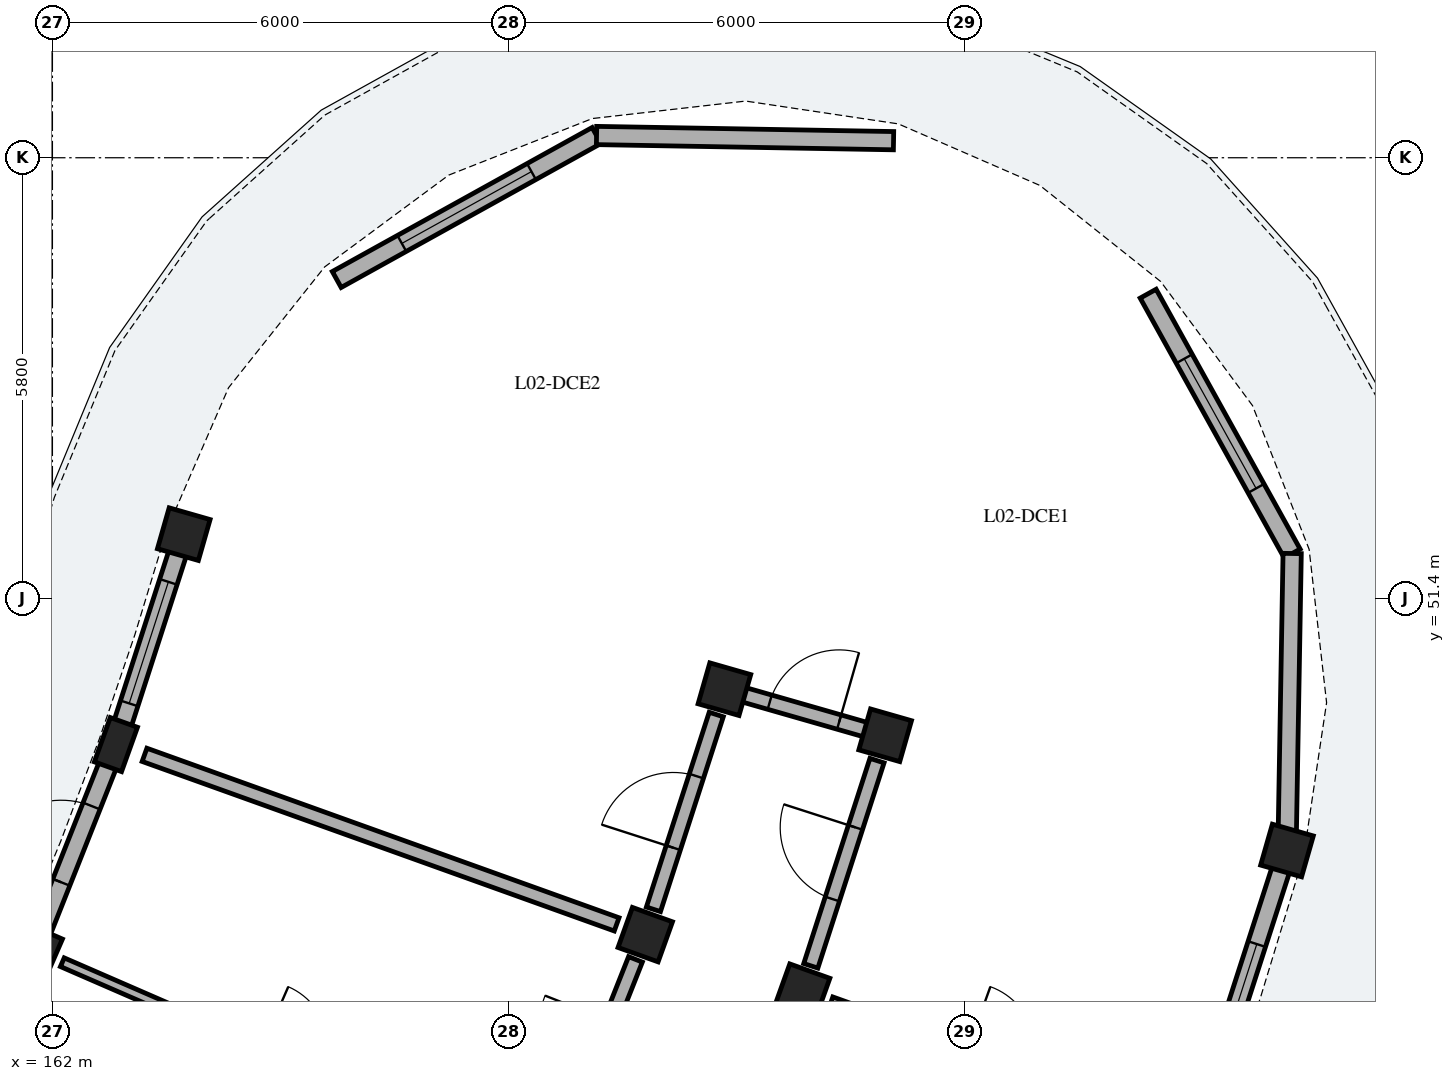
"""IFC4 building model, lengths in metres.
Left out: names, types, materials, properties, quantities, classifications, styles, units other than length and angle.
Written with IfcOpenShell. Run it as: python <this file> out.ifc"""

import sys

from ifc_helpers import new_model, si_unit, direction, frame, frame_2d, origin, origin_2d, place, context, subcontext, project, spatial, rectangle, extrude, element, fill, save


model = new_model("IFC4")
c1 = context("Model", 3, precision=1e-05, world=origin(), true_north=direction((0.0, 1.0)))
c2 = subcontext(c1, "Body", "Model", "MODEL_VIEW")
j1 = project(units=[si_unit("LENGTHUNIT", "METRE"), si_unit("PLANEANGLEUNIT", "RADIAN")], contexts=[c1])
p1 = place(None, origin())
s1 = spatial("IfcSite", under=j1, at=p1, CompositionType="ELEMENT")
p2 = place(p1, origin())
s2 = spatial("IfcBuilding", under=s1, at=p2, CompositionType="ELEMENT")
p3 = place(p2, frame((0.0, 0.0, 8.84)))
s3 = spatial("IfcBuildingStorey", under=s2, at=p3, CompositionType="ELEMENT", Elevation=8.84)
p4 = place(p3, frame((161.763, 46.776, 0.0), z_axis=(0.0, 0.0, 1.0), x_axis=(0.917060074385, -0.398749068925, 0.0)))
e1 = element("IfcColumn", 1, at=p4, inside=s3, PredefinedType="COLUMN", context=c2, shape_type="SweptSolid", body=[
    extrude(rectangle(XDim=0.56, YDim=0.56, at=origin_2d()), origin(), (0.0, 0.0, 1.0), 3.105),
])
p5 = place(p3, frame((162.835, 49.479, 0.0), z_axis=(0.0, 0.0, 1.0), x_axis=(0.941176015256, -0.337916718003, 0.0)))
e2 = element("IfcColumn", 2, at=p5, inside=s3, PredefinedType="PILASTER", context=c2, shape_type="SweptSolid", body=[
    extrude(rectangle(XDim=0.38, YDim=0.62, at=origin_2d()), origin(), (0.0, 0.0, 1.0), 3.105),
])
for number, where, z_axis, x_axis in (
    (3, (169.8, 46.979, 0.0), (0.0, 0.0, 1.0), (0.941, -0.338, 0.0)),
    (4, (171.871, 46.236, 0.0), (0.0, 0.0, 1.0), (0.941, -0.338, 0.0)),
    (5, (163.728, 52.248, 0.0), (0.0, 0.0, 1.0), (0.961, -0.276, 0.0)),
    (6, (170.841, 50.208, 0.0), (0.0, 0.0, 1.0), (0.961, -0.276, 0.0)),
    (7, (172.956, 49.602, 0.0), (0.0, 0.0, 1.0), (0.961, -0.276, 0.0)),
    (8, (178.243, 48.086, 0.0), (0.0, 0.0, 1.0), (0.961, -0.276, 0.0)),
):
    element("IfcColumn", number, at=place(p3, frame(where, z_axis=z_axis, x_axis=x_axis)), inside=s3, PredefinedType="COLUMN", context=c2, shape_type="SweptSolid", body=[
        extrude(rectangle(XDim=0.56, YDim=0.56, at=origin_2d()), origin(), (0.0, 0.0, 1.0), 3.105),
    ])
p6 = place(p3, frame((161.855, 47.008, 0.0), z_axis=(0.0, 0.0, 1.0), x_axis=(0.368558756085, 0.9296044553, 0.0)))
e9 = element("IfcWall", 9, at=p6, inside=s3, PredefinedType="SOLIDWALL", context=c2, shape_type="SweptSolid", body=[
    extrude(rectangle(XDim=2.499, YDim=0.24, at=frame_2d((1.249, 0.0))), origin(), (0.0, 0.0, 1.0), 2.355),
])
p7 = place(p6, frame((0.709, 0.0, 0.0)))
e10 = element("IfcOpeningElement", 10, at=p7, cuts=e9, PredefinedType="OPENING", context=c2, shape_type="SweptSolid", body=[
    extrude(rectangle(XDim=1.08, YDim=2.15, at=frame_2d((0.54, 1.075))), frame((0.0, 0.13, 0.0), z_axis=(0.0, -1.0, 0.0), x_axis=(1.0, 0.0, 0.0)), (0.0, 0.0, 1.0), 0.26),
])
p8 = place(p3, frame((177.096, 44.529, 0.0), z_axis=(0.0, 0.0, 1.0), x_axis=(0.306949591136, 0.951725773793, 0.0)))
e11 = element("IfcWall", 11, at=p8, inside=s3, PredefinedType="SOLIDWALL", context=c2, shape_type="SweptSolid", body=[
    extrude(rectangle(XDim=3.487, YDim=0.24, at=frame_2d((1.743, 0.0))), origin(), (0.0, 0.0, 1.0), 2.355),
])
p9 = place(p8, frame((1.043, 0.0, 0.55)))
e12 = element("IfcOpeningElement", 12, at=p9, cuts=e11, PredefinedType="OPENING", context=c2, shape_type="SweptSolid", body=[
    extrude(rectangle(XDim=1.4, YDim=1.635, at=frame_2d((0.7, 0.817))), frame((0.0, 0.13, 0.0), z_axis=(0.0, -1.0, 0.0), x_axis=(1.0, 0.0, 0.0)), (0.0, 0.0, 1.0), 0.26),
])
p10 = place(p3, frame((162.884, 49.632, 0.0), z_axis=(0.0, 0.0, 1.0), x_axis=(0.306979942778, 0.951715984279, 0.0)))
e13 = element("IfcWall", 13, at=p10, inside=s3, PredefinedType="SOLIDWALL", context=c2, shape_type="SweptSolid", body=[
    extrude(rectangle(XDim=2.499, YDim=0.24, at=frame_2d((1.25, 0.0))), origin(), (0.0, 0.0, 1.0), 2.355),
])
p11 = place(p10, frame((0.409, 0.0, 0.55)))
e14 = element("IfcOpeningElement", 14, at=p11, cuts=e13, PredefinedType="OPENING", context=c2, shape_type="SweptSolid", body=[
    extrude(rectangle(XDim=1.68, YDim=1.585, at=frame_2d((0.84, 0.792))), frame((0.0, 0.13, 0.0), z_axis=(0.0, -1.0, 0.0), x_axis=(1.0, 0.0, 0.0)), (0.0, 0.0, 1.0), 0.26),
])
p12 = place(p3, frame((165.741, 55.598, 0.0), z_axis=(0.0, 0.0, 1.0), x_axis=(0.874616555828, 0.48481530532, 0.0)))
e15 = element("IfcWall", 15, at=p12, inside=s3, PredefinedType="SOLIDWALL", context=c2, shape_type="SweptSolid", body=[
    extrude(rectangle(XDim=3.908, YDim=0.24, at=frame_2d((1.954, 0.0))), origin(), (0.0, 0.0, 1.0), 2.355),
])
p13 = place(p12, frame((0.979, 0.0, 0.4)))
e16 = element("IfcOpeningElement", 16, at=p13, cuts=e15, PredefinedType="OPENING", context=c2, shape_type="SweptSolid", body=[
    extrude(rectangle(XDim=1.95, YDim=1.78, at=frame_2d((0.975, 0.89))), frame((0.0, 0.13, 0.0), z_axis=(0.0, -1.0, 0.0), x_axis=(1.0, 0.0, 0.0)), (0.0, 0.0, 1.0), 0.26),
])
p14 = place(p3, frame((169.159, 57.493, 0.0), z_axis=(0.0, 0.0, 1.0), x_axis=(0.999847005776, -0.017491856396, 0.0)))
e17 = element("IfcWall", 17, at=p14, inside=s3, PredefinedType="SOLIDWALL", context=c2, shape_type="SweptSolid", body=[
    extrude(rectangle(XDim=3.908, YDim=0.24, at=frame_2d((1.954, 0.0))), origin(), (0.0, 0.0, 1.0), 2.355),
])
p15 = place(p3, frame((176.417, 55.412, 0.0), z_axis=(0.0, 0.0, 1.0), x_axis=(0.48481530532, -0.874616555828, 0.0)))
e18 = element("IfcWall", 18, at=p15, inside=s3, PredefinedType="SOLIDWALL", context=c2, shape_type="SweptSolid", body=[
    extrude(rectangle(XDim=3.908, YDim=0.24, at=frame_2d((1.954, 0.0))), origin(), (0.0, 0.0, 1.0), 2.355),
])
p16 = place(p15, frame((0.979, 0.0, 0.4)))
e19 = element("IfcOpeningElement", 19, at=p16, cuts=e18, PredefinedType="OPENING", context=c2, shape_type="SweptSolid", body=[
    extrude(rectangle(XDim=1.95, YDim=1.78, at=frame_2d((0.975, 0.89))), frame((0.0, 0.13, 0.0), z_axis=(0.0, -1.0, 0.0), x_axis=(1.0, 0.0, 0.0)), (0.0, 0.0, 1.0), 0.26),
])
p17 = place(p3, frame((178.311, 51.993, 0.0), z_axis=(0.0, 0.0, 1.0), x_axis=(-0.017428315893, -0.999848115368, 0.0)))
e20 = element("IfcWall", 20, at=p17, inside=s3, PredefinedType="SOLIDWALL", context=c2, shape_type="SweptSolid", body=[
    extrude(rectangle(XDim=3.908, YDim=0.24, at=frame_2d((1.954, 0.0))), origin(), (0.0, 0.0, 1.0), 2.355),
])
p18 = place(p3, frame((162.13, 46.616, 0.0), z_axis=(0.0, 0.0, 1.0), x_axis=(0.9170582943, -0.398753162817, 0.0)))
e21 = element("IfcWall", 21, at=p18, inside=s3, PredefinedType="PARTITIONING", context=c2, shape_type="SweptSolid", body=[
    extrude(rectangle(XDim=6.6, YDim=0.125, at=frame_2d((3.3, 0.0))), origin(), (0.0, 0.0, 1.0), 2.37),
])
p19 = place(p18, frame((2.855, 0.0, 0.0)))
e22 = element("IfcOpeningElement", 22, at=p19, cuts=e21, PredefinedType="OPENING", context=c2, shape_type="SweptSolid", body=[
    extrude(rectangle(XDim=0.89, YDim=2.1, at=frame_2d((0.445, 1.05))), frame((0.0, 0.073, 0.0), z_axis=(0.0, -1.0, 0.0), x_axis=(1.0, 0.0, 0.0)), (0.0, 0.0, 1.0), 0.145),
])
p20 = place(p3, frame((168.678, 44.15, 0.0), z_axis=(0.0, 0.0, 1.0), x_axis=(0.368528468945, 0.929616462622, 0.0)))
e23 = element("IfcWall", 23, at=p20, inside=s3, PredefinedType="PARTITIONING", context=c2, shape_type="SweptSolid", body=[
    extrude(rectangle(XDim=2.693, YDim=0.195, at=frame_2d((1.346, 0.0))), origin(), (0.0, 0.0, 1.0), 2.37),
])
p21 = place(p20, frame((0.882, 0.0, 0.0)))
e24 = element("IfcOpeningElement", 24, at=p21, cuts=e23, PredefinedType="OPENING", context=c2, shape_type="SweptSolid", body=[
    extrude(rectangle(XDim=0.93, YDim=2.12, at=frame_2d((0.465, 1.06))), frame((0.0, 0.107, 0.0), z_axis=(0.0, -1.0, 0.0), x_axis=(1.0, 0.0, 0.0)), (0.0, 0.0, 1.0), 0.215),
])
p22 = place(p3, frame((172.247, 46.1, 0.0), z_axis=(0.0, 0.0, 1.0), x_axis=(0.941182387398, -0.337898969591, 0.0)))
e25 = element("IfcWall", 25, at=p22, inside=s3, PredefinedType="PARTITIONING", context=c2, shape_type="SweptSolid", body=[
    extrude(rectangle(XDim=4.7, YDim=0.125, at=frame_2d((2.35, 0.0))), origin(), (0.0, 0.0, 1.0), 2.37),
])
p23 = place(p22, frame((1.905, 0.0, 0.0)))
e26 = element("IfcOpeningElement", 26, at=p23, cuts=e25, PredefinedType="OPENING", context=c2, shape_type="SweptSolid", body=[
    extrude(rectangle(XDim=0.89, YDim=2.1, at=frame_2d((0.445, 1.05))), frame((0.0, 0.073, 0.0), z_axis=(0.0, -1.0, 0.0), x_axis=(1.0, 0.0, 0.0)), (0.0, 0.0, 1.0), 0.145),
])
p24 = place(p3, frame((163.212, 49.344, 0.0), z_axis=(0.0, 0.0, 1.0), x_axis=(0.941179890997, -0.337905922978, 0.0)))
e27 = element("IfcWall", 27, at=p24, inside=s3, PredefinedType="PARTITIONING", context=c2, shape_type="SweptSolid", body=[
    extrude(rectangle(XDim=6.6, YDim=0.185, at=frame_2d((3.3, 0.0))), origin(), (0.0, 0.0, 1.0), 2.37),
])
p25 = place(p3, frame((171.978, 46.569, 0.0), z_axis=(0.0, 0.0, 1.0), x_axis=(0.30694495224, 0.951727269912, 0.0)))
e28 = element("IfcWall", 28, at=p25, inside=s3, PredefinedType="PARTITIONING", context=c2, shape_type="SweptSolid", body=[
    extrude(rectangle(XDim=2.837, YDim=0.195, at=frame_2d((1.418, 0.0))), origin(), (0.0, 0.0, 1.0), 2.37),
])
p26 = place(p25, frame((0.924, 0.0, 0.0)))
e29 = element("IfcOpeningElement", 29, at=p26, cuts=e28, PredefinedType="OPENING", context=c2, shape_type="SweptSolid", body=[
    extrude(rectangle(XDim=0.99, YDim=2.16, at=frame_2d((0.495, 1.08))), frame((0.0, 0.107, 0.0), z_axis=(0.0, -1.0, 0.0), x_axis=(1.0, 0.0, 0.0)), (0.0, 0.0, 1.0), 0.215),
])
p27 = place(p3, frame((169.907, 47.312, 0.0), z_axis=(0.0, 0.0, 1.0), x_axis=(0.306883578189, 0.951747061691, 0.0)))
e30 = element("IfcWall", 30, at=p27, inside=s3, PredefinedType="PARTITIONING", context=c2, shape_type="SweptSolid", body=[
    extrude(rectangle(XDim=2.693, YDim=0.195, at=frame_2d((1.346, 0.0))), origin(), (0.0, 0.0, 1.0), 2.37),
])
p28 = place(p27, frame((0.852, 0.0, 0.0)))
e31 = element("IfcOpeningElement", 31, at=p28, cuts=e30, PredefinedType="OPENING", context=c2, shape_type="SweptSolid", body=[
    extrude(rectangle(XDim=0.99, YDim=2.16, at=frame_2d((0.495, 1.08))), frame((0.0, 0.107, 0.0), z_axis=(0.0, -1.0, 0.0), x_axis=(1.0, 0.0, 0.0)), (0.0, 0.0, 1.0), 0.215),
])
p29 = place(p3, frame((170.889, 50.194, 0.0), z_axis=(0.0, 0.0, 1.0), x_axis=(0.961264701934, -0.275626872449, 0.0)))
e32 = element("IfcWall", 32, at=p29, inside=s3, PredefinedType="PARTITIONING", context=c2, shape_type="SweptSolid", body=[
    extrude(rectangle(XDim=2.1, YDim=0.195, at=frame_2d((1.05, 0.0))), origin(), (0.0, 0.0, 1.0), 2.37),
])
p30 = place(p29, frame((0.57, 0.0, 0.0)))
e33 = element("IfcOpeningElement", 33, at=p30, cuts=e32, PredefinedType="OPENING", context=c2, shape_type="SweptSolid", body=[
    extrude(rectangle(XDim=0.95, YDim=2.13, at=frame_2d((0.475, 1.065))), frame((0.0, 0.107, 0.0), z_axis=(0.0, -1.0, 0.0), x_axis=(1.0, 0.0, 0.0)), (0.0, 0.0, 1.0), 0.215),
])
p31 = place(p7, origin())
e34 = element("IfcDoor", 34, at=p31, inside=s3, OperationType="SINGLE_SWING_LEFT", PredefinedType="DOOR", context=c2, shape_type="SweptSolid", body=[
    extrude(rectangle(XDim=1.08, YDim=2.15, at=frame_2d((0.54, 1.075))), frame((0.0, 0.025, 0.0), z_axis=(0.0, -1.0, 0.0), x_axis=(1.0, 0.0, 0.0)), (0.0, 0.0, 1.0), 0.05),
])
fill(e10, e34)
p32 = place(p9, origin())
e35 = element("IfcWindow", 35, at=p32, inside=s3, PartitioningType="SINGLE_PANEL", PredefinedType="WINDOW", context=c2, shape_type="SweptSolid", body=[
    extrude(rectangle(XDim=1.4, YDim=1.635, at=frame_2d((0.7, 0.817))), frame((0.0, 0.03, 0.0), z_axis=(0.0, -1.0, 0.0), x_axis=(1.0, 0.0, 0.0)), (0.0, 0.0, 1.0), 0.06),
])
fill(e12, e35)
p33 = place(p11, origin())
e36 = element("IfcWindow", 36, at=p33, inside=s3, PartitioningType="SINGLE_PANEL", PredefinedType="WINDOW", context=c2, shape_type="SweptSolid", body=[
    extrude(rectangle(XDim=1.68, YDim=1.585, at=frame_2d((0.84, 0.792))), frame((0.0, 0.03, 0.0), z_axis=(0.0, -1.0, 0.0), x_axis=(1.0, 0.0, 0.0)), (0.0, 0.0, 1.0), 0.06),
])
fill(e14, e36)
p34 = place(p13, origin())
e37 = element("IfcWindow", 37, at=p34, inside=s3, PartitioningType="SINGLE_PANEL", PredefinedType="WINDOW", context=c2, shape_type="SweptSolid", body=[
    extrude(rectangle(XDim=1.95, YDim=1.78, at=frame_2d((0.975, 0.89))), frame((0.0, 0.03, 0.0), z_axis=(0.0, -1.0, 0.0), x_axis=(1.0, 0.0, 0.0)), (0.0, 0.0, 1.0), 0.06),
])
fill(e16, e37)
p35 = place(p16, origin())
e38 = element("IfcWindow", 38, at=p35, inside=s3, PartitioningType="SINGLE_PANEL", PredefinedType="WINDOW", context=c2, shape_type="SweptSolid", body=[
    extrude(rectangle(XDim=1.95, YDim=1.78, at=frame_2d((0.975, 0.89))), frame((0.0, 0.03, 0.0), z_axis=(0.0, -1.0, 0.0), x_axis=(1.0, 0.0, 0.0)), (0.0, 0.0, 1.0), 0.06),
])
fill(e19, e38)
p36 = place(p26, origin())
e39 = element("IfcDoor", 39, at=p36, inside=s3, OperationType="SINGLE_SWING_RIGHT", PredefinedType="DOOR", context=c2, shape_type="SweptSolid", body=[
    extrude(rectangle(XDim=0.99, YDim=2.16, at=frame_2d((0.495, 1.08))), frame((0.0, 0.025, 0.0), z_axis=(0.0, -1.0, 0.0), x_axis=(1.0, 0.0, 0.0)), (0.0, 0.0, 1.0), 0.05),
])
fill(e29, e39)
p37 = place(p28, origin())
e40 = element("IfcDoor", 40, at=p37, inside=s3, OperationType="SINGLE_SWING_LEFT", PredefinedType="DOOR", context=c2, shape_type="SweptSolid", body=[
    extrude(rectangle(XDim=0.99, YDim=2.16, at=frame_2d((0.495, 1.08))), frame((0.0, 0.025, 0.0), z_axis=(0.0, -1.0, 0.0), x_axis=(1.0, 0.0, 0.0)), (0.0, 0.0, 1.0), 0.05),
])
fill(e31, e40)
p38 = place(p30, origin())
e41 = element("IfcDoor", 41, at=p38, inside=s3, OperationType="SINGLE_SWING_RIGHT", PredefinedType="DOOR", context=c2, shape_type="SweptSolid", body=[
    extrude(rectangle(XDim=0.95, YDim=2.13, at=frame_2d((0.475, 1.065))), frame((0.0, 0.025, 0.0), z_axis=(0.0, -1.0, 0.0), x_axis=(1.0, 0.0, 0.0)), (0.0, 0.0, 1.0), 0.05),
])
fill(e33, e41)
save(model, sys.argv[1])
